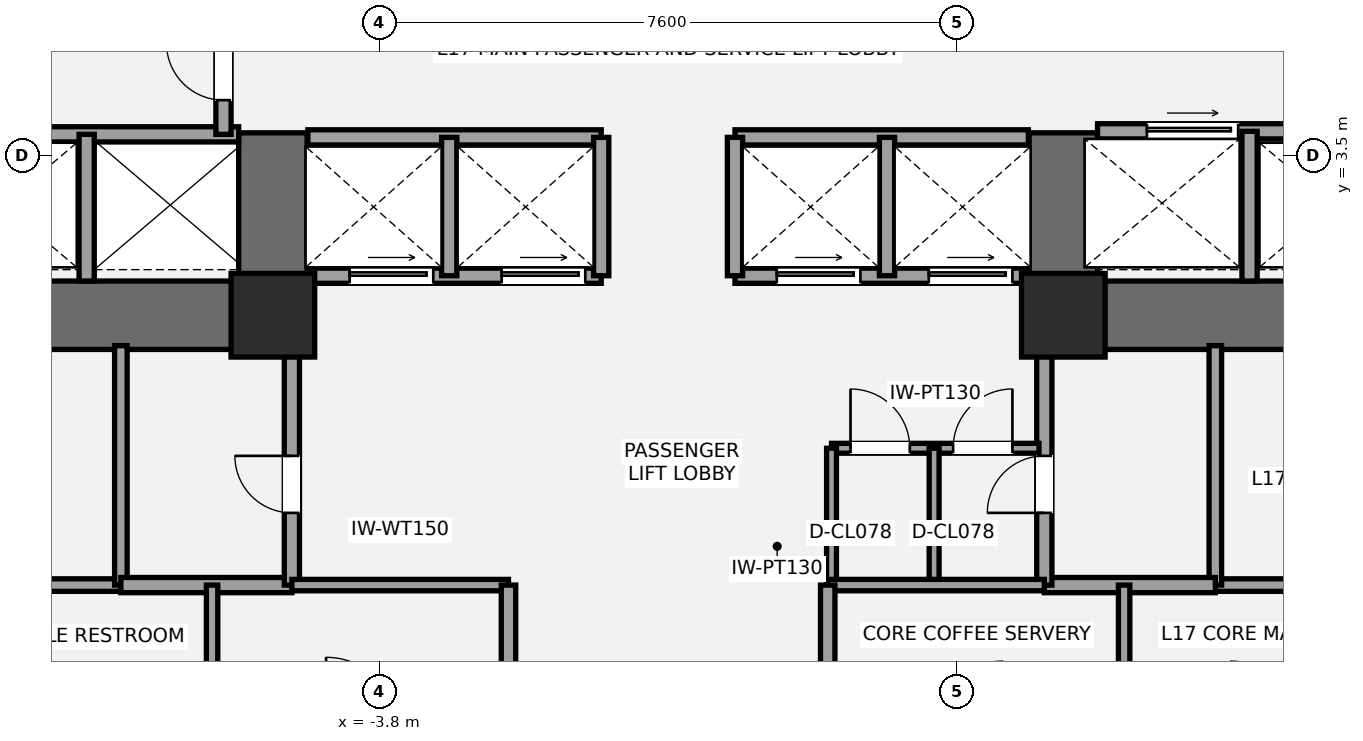
"""IFC4 building model, lengths in metres.
Left out: names, types, materials, properties, quantities, classifications, styles, units other than length and angle.
Written with IfcOpenShell. Run it as: python <this file> out.ifc"""

import sys

from ifc_helpers import new_model, si_unit, direction, frame, frame_2d, origin, origin_2d, place, context, subcontext, project, spatial, rectangle, extrude, element, fill, save


model = new_model("IFC4")
c1 = context("Model", 3, precision=1e-05, world=origin(), true_north=direction((0.0, 1.0)))
c2 = subcontext(c1, "Body", "Model", "MODEL_VIEW")
j1 = project(units=[si_unit("LENGTHUNIT", "METRE"), si_unit("PLANEANGLEUNIT", "RADIAN")], contexts=[c1])
p1 = place(None, origin())
s1 = spatial("IfcSite", under=j1, at=p1, CompositionType="ELEMENT")
p2 = place(p1, origin())
s2 = spatial("IfcBuilding", under=s1, at=p2, CompositionType="ELEMENT")
p3 = place(p2, frame((0.0, 0.0, 66.6)))
s3 = spatial("IfcBuildingStorey", under=s2, at=p3, CompositionType="ELEMENT", Elevation=66.6)
p4 = place(p3, frame((-4.75, 1.4, 0.0), z_axis=(0.0, 0.0, 1.0), x_axis=(-1.0, 0.0, 0.0)))
e1 = element("IfcWall", 1, at=p4, inside=s3, PredefinedType="SHEAR", context=c2, shape_type="SweptSolid", body=[
    extrude(rectangle(XDim=9.3, YDim=0.9, at=frame_2d((4.65, 0.0))), origin(), (0.0, 0.0, 1.0), 3.6),
])
p5 = place(p4, frame((5.55, 0.0, 0.0)))
e2 = element("IfcOpeningElement", 2, at=p5, cuts=e1, PredefinedType="OPENING", context=c2, shape_type="SweptSolid", body=[
    extrude(rectangle(XDim=1.05, YDim=2.15, at=frame_2d((0.525, 1.075))), frame((0.0, 0.46, 0.0), z_axis=(0.0, -1.0, 0.0), x_axis=(1.0, 0.0, 0.0)), (0.0, 0.0, 1.0), 0.92),
])
p6 = place(p4, frame((3.88, 0.0, 0.0)))
e3 = element("IfcOpeningElement", 3, at=p6, cuts=e1, PredefinedType="OPENING", context=c2, shape_type="SweptSolid", body=[
    extrude(rectangle(XDim=1.1, YDim=2.2, at=frame_2d((0.55, 1.1))), frame((0.0, 0.46, 0.0), z_axis=(0.0, -1.0, 0.0), x_axis=(1.0, 0.0, 0.0)), (0.0, 0.0, 1.0), 0.92),
])
p7 = place(p3, frame((-5.2, 0.95, 0.0), z_axis=(0.0, 0.0, 1.0), x_axis=(0.0, 1.0, 0.0)))
e4 = element("IfcWall", 4, at=p7, inside=s3, PredefinedType="SHEAR", context=c2, shape_type="SweptSolid", body=[
    extrude(rectangle(XDim=2.85, YDim=0.9, at=frame_2d((1.425, 0.0))), origin(), (0.0, 0.0, 1.0), 3.6),
])
p8 = place(p3, frame((14.05, 1.4, 0.0), z_axis=(0.0, 0.0, 1.0), x_axis=(-1.0, 0.0, 0.0)))
e5 = element("IfcWall", 5, at=p8, inside=s3, PredefinedType="SHEAR", context=c2, shape_type="SweptSolid", body=[
    extrude(rectangle(XDim=9.3, YDim=0.9, at=frame_2d((4.65, 0.0))), origin(), (0.0, 0.0, 1.0), 3.6),
])
p9 = place(p8, frame((2.7, 0.0, 0.0)))
e6 = element("IfcOpeningElement", 6, at=p9, cuts=e5, PredefinedType="OPENING", context=c2, shape_type="SweptSolid", body=[
    extrude(rectangle(XDim=1.05, YDim=2.15, at=frame_2d((0.525, 1.075))), frame((0.0, 0.46, 0.0), z_axis=(0.0, -1.0, 0.0), x_axis=(1.0, 0.0, 0.0)), (0.0, 0.0, 1.0), 0.92),
])
p10 = place(p8, frame((4.7, 0.0, 0.0)))
e7 = element("IfcOpeningElement", 7, at=p10, cuts=e5, PredefinedType="OPENING", context=c2, shape_type="SweptSolid", body=[
    extrude(rectangle(XDim=1.1, YDim=2.2, at=frame_2d((0.55, 1.1))), frame((0.0, 0.46, 0.0), z_axis=(0.0, -1.0, 0.0), x_axis=(1.0, 0.0, 0.0)), (0.0, 0.0, 1.0), 0.92),
])
p11 = place(p3, frame((5.2, 0.95, 0.0), z_axis=(0.0, 0.0, 1.0), x_axis=(0.0, 1.0, 0.0)))
e8 = element("IfcWall", 8, at=p11, inside=s3, PredefinedType="SHEAR", context=c2, shape_type="SweptSolid", body=[
    extrude(rectangle(XDim=2.85, YDim=0.9, at=frame_2d((1.425, 0.0))), origin(), (0.0, 0.0, 1.0), 3.6),
])
for number, where, z_axis, x_axis in (
    (9, (-5.2, 1.4, 0.0), (0.0, 0.0, 1.0), (1.0, 0.0, 0.0)),
    (10, (5.2, 1.4, 0.0), (0.0, 0.0, 1.0), (1.0, 0.0, 0.0)),
):
    element("IfcColumn", number, at=place(p3, frame(where, z_axis=z_axis, x_axis=x_axis)), inside=s3, PredefinedType="COLUMN", context=c2, shape_type="SweptSolid", body=[
        extrude(rectangle(XDim=1.1, YDim=1.1, at=origin_2d()), origin(), (0.0, 0.0, 1.0), 3.6),
    ])
p12 = place(p3, frame((-13.45, -2.15, 0.0), z_axis=(0.0, 0.0, 1.0), x_axis=(1.0, 0.0, 0.0)))
e11 = element("IfcWall", 11, at=p12, inside=s3, PredefinedType="PARTITIONING", context=c2, shape_type="SweptSolid", body=[
    extrude(rectangle(XDim=6.25, YDim=0.165, at=frame_2d((3.125, 0.0))), origin(), (0.0, 0.0, 1.0), 3.4),
])
p13 = place(p3, frame((-7.2, -2.15, 0.0), z_axis=(0.0, 0.0, 1.0), x_axis=(0.0, 1.0, 0.0)))
e12 = element("IfcWall", 12, at=p13, inside=s3, PredefinedType="PARTITIONING", context=c2, shape_type="SweptSolid", body=[
    extrude(rectangle(XDim=3.15, YDim=0.165, at=frame_2d((1.575, 0.0))), origin(), (0.0, 0.0, 1.0), 3.4),
])
p14 = place(p3, frame((-7.2, -2.15, 0.0), z_axis=(0.0, 0.0, 1.0), x_axis=(1.0, 0.0, 0.0)))
e13 = element("IfcWall", 13, at=p14, inside=s3, PredefinedType="SOLIDWALL", context=c2, shape_type="SweptSolid", body=[
    extrude(rectangle(XDim=2.25, YDim=0.2, at=frame_2d((1.125, 0.0))), origin(), (0.0, 0.0, 1.0), 3.4),
])
p15 = place(p3, frame((-4.95, -2.15, 0.0), z_axis=(0.0, 0.0, 1.0), x_axis=(0.0, 1.0, 0.0)))
e14 = element("IfcWall", 14, at=p15, inside=s3, PredefinedType="SOLIDWALL", context=c2, shape_type="SweptSolid", body=[
    extrude(rectangle(XDim=3.15, YDim=0.2, at=frame_2d((1.575, 0.0))), origin(), (0.0, 0.0, 1.0), 2.853),
])
p16 = place(p15, frame((0.95, 0.0, 0.0)))
e15 = element("IfcOpeningElement", 15, at=p16, cuts=e14, PredefinedType="OPENING", context=c2, shape_type="SweptSolid", body=[
    extrude(rectangle(XDim=0.75, YDim=2.1, at=frame_2d((0.375, 1.05))), frame((0.0, 0.11, 0.0), z_axis=(0.0, -1.0, 0.0), x_axis=(1.0, 0.0, 0.0)), (0.0, 0.0, 1.0), 0.22),
])
p17 = place(p3, frame((7.2, -2.15, 0.0), z_axis=(0.0, 0.0, 1.0), x_axis=(1.0, 0.0, 0.0)))
e16 = element("IfcWall", 16, at=p17, inside=s3, PredefinedType="PARTITIONING", context=c2, shape_type="SweptSolid", body=[
    extrude(rectangle(XDim=6.25, YDim=0.165, at=frame_2d((3.125, 0.0))), origin(), (0.0, 0.0, 1.0), 3.4),
])
p18 = place(p3, frame((7.2, -2.15, 0.0), z_axis=(0.0, 0.0, 1.0), x_axis=(0.0, 1.0, 0.0)))
e17 = element("IfcWall", 17, at=p18, inside=s3, PredefinedType="PARTITIONING", context=c2, shape_type="SweptSolid", body=[
    extrude(rectangle(XDim=3.15, YDim=0.165, at=frame_2d((1.575, 0.0))), origin(), (0.0, 0.0, 1.0), 2.853),
])
p19 = place(p3, frame((4.95, -2.15, 0.0), z_axis=(0.0, 0.0, 1.0), x_axis=(1.0, 0.0, 0.0)))
e18 = element("IfcWall", 18, at=p19, inside=s3, PredefinedType="SOLIDWALL", context=c2, shape_type="SweptSolid", body=[
    extrude(rectangle(XDim=2.25, YDim=0.2, at=frame_2d((1.125, 0.0))), origin(), (0.0, 0.0, 1.0), 3.4),
])
p20 = place(p3, frame((4.95, -2.15, 0.0), z_axis=(0.0, 0.0, 1.0), x_axis=(0.0, 1.0, 0.0)))
e19 = element("IfcWall", 19, at=p20, inside=s3, PredefinedType="SOLIDWALL", context=c2, shape_type="SweptSolid", body=[
    extrude(rectangle(XDim=3.15, YDim=0.2, at=frame_2d((1.575, 0.0))), origin(), (0.0, 0.0, 1.0), 2.853),
])
p21 = place(p20, frame((0.95, 0.0, 0.0)))
e20 = element("IfcOpeningElement", 20, at=p21, cuts=e19, PredefinedType="OPENING", context=c2, shape_type="SweptSolid", body=[
    extrude(rectangle(XDim=0.75, YDim=2.1, at=frame_2d((0.375, 1.05))), frame((0.0, 0.11, 0.0), z_axis=(0.0, -1.0, 0.0), x_axis=(1.0, 0.0, 0.0)), (0.0, 0.0, 1.0), 0.22),
])
p22 = place(p3, frame((2.15, -0.35, 0.0), z_axis=(0.0, 0.0, 1.0), x_axis=(1.0, 0.0, 0.0)))
e21 = element("IfcWall", 21, at=p22, inside=s3, PredefinedType="PARTITIONING", context=c2, shape_type="SweptSolid", body=[
    extrude(rectangle(XDim=2.73, YDim=0.13, at=frame_2d((1.365, 0.0))), origin(), (0.0, 0.0, 1.0), 3.4),
])
p23 = place(p22, frame((0.25, 0.0, 0.0)))
e22 = element("IfcOpeningElement", 22, at=p23, cuts=e21, PredefinedType="OPENING", context=c2, shape_type="SweptSolid", body=[
    extrude(rectangle(XDim=0.78, YDim=2.1, at=frame_2d((0.39, 1.05))), frame((0.0, 0.075, 0.0), z_axis=(0.0, -1.0, 0.0), x_axis=(1.0, 0.0, 0.0)), (0.0, 0.0, 1.0), 0.15),
])
p24 = place(p22, frame((1.6, 0.0, 0.0)))
e23 = element("IfcOpeningElement", 23, at=p24, cuts=e21, PredefinedType="OPENING", context=c2, shape_type="SweptSolid", body=[
    extrude(rectangle(XDim=0.78, YDim=2.1, at=frame_2d((0.39, 1.05))), frame((0.0, 0.075, 0.0), z_axis=(0.0, -1.0, 0.0), x_axis=(1.0, 0.0, 0.0)), (0.0, 0.0, 1.0), 0.15),
])
for number, where, z_axis, x_axis in (
    (24, (2.15, -2.15, 0.0), (0.0, 0.0, 1.0), (0.0, 1.0, 0.0)),
    (25, (3.5, -2.15, 0.0), (0.0, 0.0, 1.0), (0.0, 1.0, 0.0)),
):
    element("IfcWall", number, at=place(p3, frame(where, z_axis=z_axis, x_axis=x_axis)), inside=s3, PredefinedType="PARTITIONING", context=c2, shape_type="SweptSolid", body=[
        extrude(rectangle(XDim=1.8, YDim=0.13, at=frame_2d((0.9, 0.0))), origin(), (0.0, 0.0, 1.0), 3.4),
    ])
p25 = place(p3, frame((-9.78, 3.78, 0.0), z_axis=(0.0, 0.0, 1.0), x_axis=(1.0, 0.0, 0.0)))
e26 = element("IfcWall", 26, at=p25, inside=s3, PredefinedType="SOLIDWALL", context=c2, shape_type="SweptSolid", body=[
    extrude(rectangle(XDim=4.13, YDim=0.2, at=frame_2d((2.065, 0.0))), origin(), (0.0, 0.0, 1.0), 3.4),
])
p26 = place(p3, frame((-7.65, 1.85, 0.0), z_axis=(0.0, 0.0, 1.0), x_axis=(0.0, 1.0, 0.0)))
e27 = element("IfcWall", 27, at=p26, inside=s3, PredefinedType="SOLIDWALL", context=c2, shape_type="SweptSolid", body=[
    extrude(rectangle(XDim=1.93, YDim=0.2, at=frame_2d((0.965, 0.0))), origin(), (0.0, 0.0, 1.0), 3.4),
])
p27 = place(p3, frame((-5.85, 3.78, 0.0), z_axis=(0.0, 0.0, 1.0), x_axis=(0.0, 1.0, 0.0)))
e28 = element("IfcWall", 28, at=p27, inside=s3, PredefinedType="SOLIDWALL", context=c2, shape_type="SweptSolid", body=[
    extrude(rectangle(XDim=1.69, YDim=0.2, at=frame_2d((0.845, 0.0))), origin(), (0.0, 0.0, 1.0), 3.4),
])
p28 = place(p27, frame((0.45, 0.0, 0.0)))
e29 = element("IfcOpeningElement", 29, at=p28, cuts=e28, PredefinedType="OPENING", context=c2, shape_type="SweptSolid", body=[
    extrude(rectangle(XDim=0.75, YDim=2.1, at=frame_2d((0.375, 1.05))), frame((0.0, 0.11, 0.0), z_axis=(0.0, -1.0, 0.0), x_axis=(1.0, 0.0, 0.0)), (0.0, 0.0, 1.0), 0.22),
])
p29 = place(p3, frame((5.65, 3.82, 0.0), z_axis=(0.0, 0.0, 1.0), x_axis=(1.0, 0.0, 0.0)))
e30 = element("IfcWall", 30, at=p29, inside=s3, PredefinedType="SOLIDWALL", context=c2, shape_type="SweptSolid", body=[
    extrude(rectangle(XDim=4.13, YDim=0.2, at=frame_2d((2.065, 0.0))), origin(), (0.0, 0.0, 1.0), 3.4),
])
p30 = place(p29, frame((0.65, 0.0, 0.0)))
e31 = element("IfcOpeningElement", 31, at=p30, cuts=e30, PredefinedType="OPENING", context=c2, shape_type="SweptSolid", body=[
    extrude(rectangle(XDim=1.2, YDim=2.2, at=frame_2d((0.6, 1.1))), frame((0.0, 0.11, 0.0), z_axis=(0.0, -1.0, 0.0), x_axis=(1.0, 0.0, 0.0)), (0.0, 0.0, 1.0), 0.22),
])
p31 = place(p3, frame((7.65, 1.85, 0.0), z_axis=(0.0, 0.0, 1.0), x_axis=(0.0, 1.0, 0.0)))
e32 = element("IfcWall", 32, at=p31, inside=s3, PredefinedType="SOLIDWALL", context=c2, shape_type="SweptSolid", body=[
    extrude(rectangle(XDim=1.97, YDim=0.2, at=frame_2d((0.985, 0.0))), origin(), (0.0, 0.0, 1.0), 3.4),
])
p32 = place(p3, frame((-4.74, 1.92, 0.0), z_axis=(0.0, 0.0, 1.0), x_axis=(1.0, 0.0, 0.0)))
e33 = element("IfcWall", 33, at=p32, inside=s3, PredefinedType="SOLIDWALL", context=c2, shape_type="SweptSolid", body=[
    extrude(rectangle(XDim=3.86, YDim=0.2, at=frame_2d((1.93, 0.0))), origin(), (0.0, 0.0, 1.0), 2.39),
])
p33 = place(p32, frame((0.55, 0.0, 0.0)))
e34 = element("IfcOpeningElement", 34, at=p33, cuts=e33, PredefinedType="OPENING", context=c2, shape_type="SweptSolid", body=[
    extrude(rectangle(XDim=1.1, YDim=2.2, at=frame_2d((0.55, 1.1))), frame((0.0, 0.11, 0.0), z_axis=(0.0, -1.0, 0.0), x_axis=(1.0, 0.0, 0.0)), (0.0, 0.0, 1.0), 0.22),
])
p34 = place(p32, frame((2.55, 0.0, 0.0)))
e35 = element("IfcOpeningElement", 35, at=p34, cuts=e33, PredefinedType="OPENING", context=c2, shape_type="SweptSolid", body=[
    extrude(rectangle(XDim=1.1, YDim=2.2, at=frame_2d((0.55, 1.1))), frame((0.0, 0.11, 0.0), z_axis=(0.0, -1.0, 0.0), x_axis=(1.0, 0.0, 0.0)), (0.0, 0.0, 1.0), 0.22),
])
p35 = place(p3, frame((0.88, 1.92, 0.0), z_axis=(0.0, 0.0, 1.0), x_axis=(1.0, 0.0, 0.0)))
e36 = element("IfcWall", 36, at=p35, inside=s3, PredefinedType="SOLIDWALL", context=c2, shape_type="SweptSolid", body=[
    extrude(rectangle(XDim=3.86, YDim=0.2, at=frame_2d((1.93, 0.0))), origin(), (0.0, 0.0, 1.0), 2.39),
])
p36 = place(p35, frame((0.55, 0.0, 0.0)))
e37 = element("IfcOpeningElement", 37, at=p36, cuts=e36, PredefinedType="OPENING", context=c2, shape_type="SweptSolid", body=[
    extrude(rectangle(XDim=1.1, YDim=2.2, at=frame_2d((0.55, 1.1))), frame((0.0, 0.11, 0.0), z_axis=(0.0, -1.0, 0.0), x_axis=(1.0, 0.0, 0.0)), (0.0, 0.0, 1.0), 0.22),
])
p37 = place(p35, frame((2.55, 0.0, 0.0)))
e38 = element("IfcOpeningElement", 38, at=p37, cuts=e36, PredefinedType="OPENING", context=c2, shape_type="SweptSolid", body=[
    extrude(rectangle(XDim=1.1, YDim=2.2, at=frame_2d((0.55, 1.1))), frame((0.0, 0.11, 0.0), z_axis=(0.0, -1.0, 0.0), x_axis=(1.0, 0.0, 0.0)), (0.0, 0.0, 1.0), 0.22),
])
for number, where, z_axis, x_axis in (
    (39, (-4.74, 3.74, 0.0), (0.0, 0.0, 1.0), (1.0, 0.0, 0.0)),
    (40, (0.88, 3.74, 0.0), (0.0, 0.0, 1.0), (1.0, 0.0, 0.0)),
):
    element("IfcWall", number, at=place(p3, frame(where, z_axis=z_axis, x_axis=x_axis)), inside=s3, PredefinedType="SOLIDWALL", context=c2, shape_type="SweptSolid", body=[
        extrude(rectangle(XDim=3.86, YDim=0.2, at=frame_2d((1.93, 0.0))), origin(), (0.0, 0.0, 1.0), 3.4),
    ])
for number, where, z_axis, x_axis in (
    (41, (-2.88, 1.92, 0.0), (0.0, 0.0, 1.0), (0.0, 1.0, 0.0)),
    (42, (2.88, 1.92, 0.0), (0.0, 0.0, 1.0), (0.0, 1.0, 0.0)),
    (43, (-0.88, 1.92, 0.0), (0.0, 0.0, 1.0), (0.0, 1.0, 0.0)),
    (44, (0.88, 1.92, 0.0), (0.0, 0.0, 1.0), (0.0, 1.0, 0.0)),
):
    element("IfcWall", number, at=place(p3, frame(where, z_axis=z_axis, x_axis=x_axis)), inside=s3, PredefinedType="SOLIDWALL", context=c2, shape_type="SweptSolid", body=[
        extrude(rectangle(XDim=1.82, YDim=0.2, at=frame_2d((0.91, 0.0))), origin(), (0.0, 0.0, 1.0), 3.4),
    ])
p38 = place(p3, frame((-4.95, -2.15, 0.0), z_axis=(0.0, 0.0, 1.0), x_axis=(1.0, 0.0, 0.0)))
e45 = element("IfcWall", 45, at=p38, inside=s3, PredefinedType="PLUMBINGWALL", context=c2, shape_type="SweptSolid", body=[
    extrude(rectangle(XDim=2.85, YDim=0.15, at=frame_2d((1.425, 0.0))), origin(), (0.0, 0.0, 1.0), 3.4),
])
p39 = place(p3, frame((-2.1, -4.05, 0.0), z_axis=(0.0, 0.0, 1.0), x_axis=(0.0, 1.0, 0.0)))
e46 = element("IfcWall", 46, at=p39, inside=s3, PredefinedType="PLUMBINGWALL", context=c2, shape_type="SweptSolid", body=[
    extrude(rectangle(XDim=1.9, YDim=0.19, at=frame_2d((0.95, 0.0))), origin(), (0.0, 0.0, 1.0), 3.4),
])
p40 = place(p3, frame((-6.0, -4.05, 0.0), z_axis=(0.0, 0.0, 1.0), x_axis=(0.0, 1.0, 0.0)))
e47 = element("IfcWall", 47, at=p40, inside=s3, PredefinedType="PLUMBINGWALL", context=c2, shape_type="SweptSolid", body=[
    extrude(rectangle(XDim=1.9, YDim=0.15, at=frame_2d((0.95, 0.0))), origin(), (0.0, 0.0, 1.0), 2.841),
])
p41 = place(p3, frame((2.1, -2.15, 0.0), z_axis=(0.0, 0.0, 1.0), x_axis=(1.0, 0.0, 0.0)))
e48 = element("IfcWall", 48, at=p41, inside=s3, PredefinedType="PLUMBINGWALL", context=c2, shape_type="SweptSolid", body=[
    extrude(rectangle(XDim=2.85, YDim=0.15, at=frame_2d((1.425, 0.0))), origin(), (0.0, 0.0, 1.0), 3.4),
])
p42 = place(p3, frame((2.1, -4.05, 0.0), z_axis=(0.0, 0.0, 1.0), x_axis=(0.0, 1.0, 0.0)))
e49 = element("IfcWall", 49, at=p42, inside=s3, PredefinedType="PLUMBINGWALL", context=c2, shape_type="SweptSolid", body=[
    extrude(rectangle(XDim=1.9, YDim=0.19, at=frame_2d((0.95, 0.0))), origin(), (0.0, 0.0, 1.0), 3.4),
])
p43 = place(p3, frame((6.0, -4.05, 0.0), z_axis=(0.0, 0.0, 1.0), x_axis=(0.0, 1.0, 0.0)))
e50 = element("IfcWall", 50, at=p43, inside=s3, PredefinedType="PLUMBINGWALL", context=c2, shape_type="SweptSolid", body=[
    extrude(rectangle(XDim=1.9, YDim=0.15, at=frame_2d((0.95, 0.0))), origin(), (0.0, 0.0, 1.0), 2.841),
])
p44 = place(p16, origin())
e51 = element("IfcDoor", 51, at=p44, inside=s3, OperationType="SINGLE_SWING_RIGHT", PredefinedType="DOOR", context=c2, shape_type="SweptSolid", body=[
    extrude(rectangle(XDim=0.75, YDim=2.1, at=frame_2d((0.375, 1.05))), frame((0.0, 0.025, 0.0), z_axis=(0.0, -1.0, 0.0), x_axis=(1.0, 0.0, 0.0)), (0.0, 0.0, 1.0), 0.05),
])
fill(e15, e51)
p45 = place(p21, origin())
e52 = element("IfcDoor", 52, at=p45, inside=s3, OperationType="SINGLE_SWING_LEFT", PredefinedType="DOOR", context=c2, shape_type="SweptSolid", body=[
    extrude(rectangle(XDim=0.75, YDim=2.1, at=frame_2d((0.375, 1.05))), frame((0.0, 0.025, 0.0), z_axis=(0.0, -1.0, 0.0), x_axis=(1.0, 0.0, 0.0)), (0.0, 0.0, 1.0), 0.05),
])
fill(e20, e52)
p46 = place(p23, origin())
e53 = element("IfcDoor", 53, at=p46, inside=s3, OperationType="SINGLE_SWING_LEFT", PredefinedType="DOOR", context=c2, shape_type="SweptSolid", body=[
    extrude(rectangle(XDim=0.78, YDim=2.1, at=frame_2d((0.39, 1.05))), frame((0.0, 0.025, 0.0), z_axis=(0.0, -1.0, 0.0), x_axis=(1.0, 0.0, 0.0)), (0.0, 0.0, 1.0), 0.05),
])
fill(e22, e53)
p47 = place(p24, origin())
e54 = element("IfcDoor", 54, at=p47, inside=s3, OperationType="SINGLE_SWING_RIGHT", PredefinedType="DOOR", context=c2, shape_type="SweptSolid", body=[
    extrude(rectangle(XDim=0.78, YDim=2.1, at=frame_2d((0.39, 1.05))), frame((0.0, 0.025, 0.0), z_axis=(0.0, -1.0, 0.0), x_axis=(1.0, 0.0, 0.0)), (0.0, 0.0, 1.0), 0.05),
])
fill(e23, e54)
p48 = place(p28, origin())
e55 = element("IfcDoor", 55, at=p48, inside=s3, OperationType="SINGLE_SWING_RIGHT", PredefinedType="DOOR", context=c2, shape_type="SweptSolid", body=[
    extrude(rectangle(XDim=0.75, YDim=2.1, at=frame_2d((0.375, 1.05))), frame((0.0, 0.025, 0.0), z_axis=(0.0, -1.0, 0.0), x_axis=(1.0, 0.0, 0.0)), (0.0, 0.0, 1.0), 0.05),
])
fill(e29, e55)
p49 = place(p30, origin())
e56 = element("IfcDoor", 56, at=p49, inside=s3, OperationType="SLIDING_TO_RIGHT", PredefinedType="DOOR", context=c2, shape_type="SweptSolid", body=[
    extrude(rectangle(XDim=1.2, YDim=2.2, at=frame_2d((0.6, 1.1))), frame((0.0, 0.025, 0.0), z_axis=(0.0, -1.0, 0.0), x_axis=(1.0, 0.0, 0.0)), (0.0, 0.0, 1.0), 0.05),
])
fill(e31, e56)
p50 = place(p33, origin())
e57 = element("IfcDoor", 57, at=p50, inside=s3, OperationType="SLIDING_TO_LEFT", PredefinedType="DOOR", context=c2, shape_type="SweptSolid", body=[
    extrude(rectangle(XDim=1.1, YDim=2.2, at=frame_2d((0.55, 1.1))), frame((0.0, 0.025, 0.0), z_axis=(0.0, -1.0, 0.0), x_axis=(1.0, 0.0, 0.0)), (0.0, 0.0, 1.0), 0.05),
])
fill(e34, e57)
p51 = place(p34, origin())
e58 = element("IfcDoor", 58, at=p51, inside=s3, OperationType="SLIDING_TO_LEFT", PredefinedType="DOOR", context=c2, shape_type="SweptSolid", body=[
    extrude(rectangle(XDim=1.1, YDim=2.2, at=frame_2d((0.55, 1.1))), frame((0.0, 0.025, 0.0), z_axis=(0.0, -1.0, 0.0), x_axis=(1.0, 0.0, 0.0)), (0.0, 0.0, 1.0), 0.05),
])
fill(e35, e58)
p52 = place(p36, origin())
e59 = element("IfcDoor", 59, at=p52, inside=s3, OperationType="SLIDING_TO_LEFT", PredefinedType="DOOR", context=c2, shape_type="SweptSolid", body=[
    extrude(rectangle(XDim=1.1, YDim=2.2, at=frame_2d((0.55, 1.1))), frame((0.0, 0.025, 0.0), z_axis=(0.0, -1.0, 0.0), x_axis=(1.0, 0.0, 0.0)), (0.0, 0.0, 1.0), 0.05),
])
fill(e37, e59)
p53 = place(p37, origin())
e60 = element("IfcDoor", 60, at=p53, inside=s3, OperationType="SLIDING_TO_LEFT", PredefinedType="DOOR", context=c2, shape_type="SweptSolid", body=[
    extrude(rectangle(XDim=1.1, YDim=2.2, at=frame_2d((0.55, 1.1))), frame((0.0, 0.025, 0.0), z_axis=(0.0, -1.0, 0.0), x_axis=(1.0, 0.0, 0.0)), (0.0, 0.0, 1.0), 0.05),
])
fill(e38, e60)
save(model, sys.argv[1])
